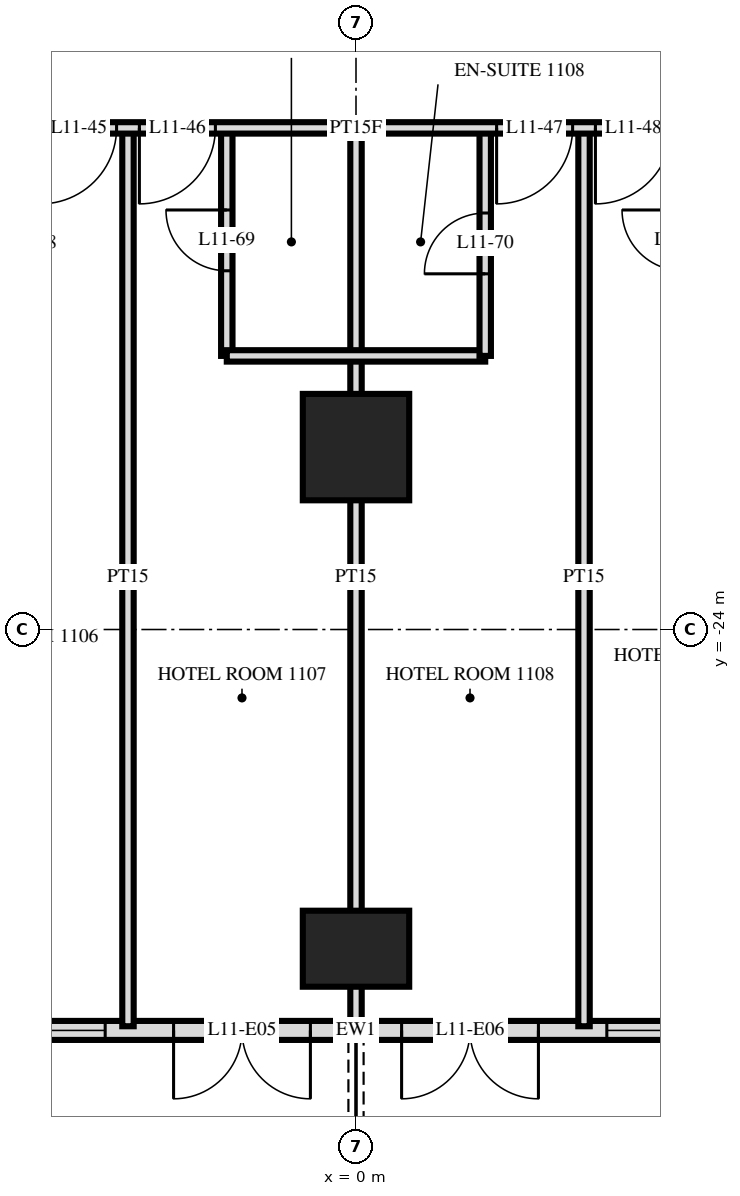
"""IFC4 building model, lengths in metres.
Left out: names, types, materials, properties, quantities, classifications, styles, units other than length and angle.
Written with IfcOpenShell. Run it as: python <this file> out.ifc"""

import sys

from ifc_helpers import new_model, si_unit, direction, frame, frame_2d, origin, origin_2d, place, context, subcontext, project, spatial, rectangle, extrude, element, fill, save


model = new_model("IFC4")
c1 = context("Model", 3, precision=1e-05, world=origin(), true_north=direction((0.0, 1.0)))
c2 = subcontext(c1, "Body", "Model", "MODEL_VIEW")
j1 = project(units=[si_unit("LENGTHUNIT", "METRE"), si_unit("PLANEANGLEUNIT", "RADIAN")], contexts=[c1])
p1 = place(None, origin())
s1 = spatial("IfcSite", under=j1, at=p1, CompositionType="ELEMENT")
p2 = place(p1, origin())
s2 = spatial("IfcBuilding", under=s1, at=p2, CompositionType="ELEMENT")
p3 = place(p2, frame((0.0, 0.0, 49.2)))
s3 = spatial("IfcBuildingStorey", under=s2, at=p3, CompositionType="ELEMENT", Elevation=49.2)
p4 = place(p3, frame((0.0, -28.2, 0.0), z_axis=(0.0, 0.0, 1.0), x_axis=(1.0, 0.0, 0.0)))
e1 = element("IfcColumn", 1, at=p4, inside=s3, PredefinedType="COLUMN", context=c2, shape_type="SweptSolid", body=[
    extrude(rectangle(XDim=1.4, YDim=1.0, at=origin_2d()), origin(), (0.0, 0.0, 1.0), 3.6),
])
p5 = place(p3, frame((0.0, -21.6, 0.0), z_axis=(0.0, 0.0, 1.0), x_axis=(1.0, 0.0, 0.0)))
e2 = element("IfcColumn", 2, at=p5, inside=s3, PredefinedType="COLUMN", context=c2, shape_type="SweptSolid", body=[
    extrude(rectangle(XDim=1.4, YDim=1.4, at=origin_2d()), origin(), (0.0, 0.0, 1.0), 3.6),
])
p6 = place(p3, frame((-28.775, -29.275, 0.0), z_axis=(0.0, 0.0, 1.0), x_axis=(1.0, 0.0, 0.0)))
e3 = element("IfcWall", 3, at=p6, inside=s3, PredefinedType="SOLIDWALL", context=c2, shape_type="SweptSolid", body=[
    extrude(rectangle(XDim=57.551, YDim=0.25, at=frame_2d((28.775, 0.0))), origin(), (0.0, 0.0, 1.0), 3.32),
])
p7 = place(p6, frame((0.575, 0.0, 0.0)))
e4 = element("IfcOpeningElement", 4, at=p7, cuts=e3, PredefinedType="OPENING", context=c2, shape_type="SweptSolid", body=[
    extrude(rectangle(XDim=1.8, YDim=2.4, at=frame_2d((0.9, 1.2))), frame((0.0, 0.135, 0.0), z_axis=(0.0, -1.0, 0.0), x_axis=(1.0, 0.0, 0.0)), (0.0, 0.0, 1.0), 0.27),
])
p8 = place(p6, frame((5.375, 0.0, 0.0)))
e5 = element("IfcOpeningElement", 5, at=p8, cuts=e3, PredefinedType="OPENING", context=c2, shape_type="SweptSolid", body=[
    extrude(rectangle(XDim=1.8, YDim=2.4, at=frame_2d((0.9, 1.2))), frame((0.0, 0.135, 0.0), z_axis=(0.0, -1.0, 0.0), x_axis=(1.0, 0.0, 0.0)), (0.0, 0.0, 1.0), 0.27),
])
p9 = place(p6, frame((8.075, 0.0, 0.3)))
e6 = element("IfcOpeningElement", 6, at=p9, cuts=e3, PredefinedType="OPENING", context=c2, shape_type="SweptSolid", body=[
    extrude(rectangle(XDim=2.4, YDim=2.1, at=frame_2d((1.2, 1.05))), frame((0.0, 0.135, 0.0), z_axis=(0.0, -1.0, 0.0), x_axis=(1.0, 0.0, 0.0)), (0.0, 0.0, 1.0), 0.27),
])
p10 = place(p6, frame((11.375, 0.0, 0.0)))
e7 = element("IfcOpeningElement", 7, at=p10, cuts=e3, PredefinedType="OPENING", context=c2, shape_type="SweptSolid", body=[
    extrude(rectangle(XDim=1.8, YDim=2.4, at=frame_2d((0.9, 1.2))), frame((0.0, 0.135, 0.0), z_axis=(0.0, -1.0, 0.0), x_axis=(1.0, 0.0, 0.0)), (0.0, 0.0, 1.0), 0.27),
])
p11 = place(p6, frame((14.075, 0.0, 0.3)))
e8 = element("IfcOpeningElement", 8, at=p11, cuts=e3, PredefinedType="OPENING", context=c2, shape_type="SweptSolid", body=[
    extrude(rectangle(XDim=2.4, YDim=2.1, at=frame_2d((1.2, 1.05))), frame((0.0, 0.135, 0.0), z_axis=(0.0, -1.0, 0.0), x_axis=(1.0, 0.0, 0.0)), (0.0, 0.0, 1.0), 0.27),
])
p12 = place(p6, frame((17.375, 0.0, 0.0)))
e9 = element("IfcOpeningElement", 9, at=p12, cuts=e3, PredefinedType="OPENING", context=c2, shape_type="SweptSolid", body=[
    extrude(rectangle(XDim=1.8, YDim=2.4, at=frame_2d((0.9, 1.2))), frame((0.0, 0.135, 0.0), z_axis=(0.0, -1.0, 0.0), x_axis=(1.0, 0.0, 0.0)), (0.0, 0.0, 1.0), 0.27),
])
p13 = place(p6, frame((20.075, 0.0, 0.3)))
e10 = element("IfcOpeningElement", 10, at=p13, cuts=e3, PredefinedType="OPENING", context=c2, shape_type="SweptSolid", body=[
    extrude(rectangle(XDim=2.4, YDim=2.1, at=frame_2d((1.2, 1.05))), frame((0.0, 0.135, 0.0), z_axis=(0.0, -1.0, 0.0), x_axis=(1.0, 0.0, 0.0)), (0.0, 0.0, 1.0), 0.27),
])
p14 = place(p6, frame((23.075, 0.0, 0.3)))
e11 = element("IfcOpeningElement", 11, at=p14, cuts=e3, PredefinedType="OPENING", context=c2, shape_type="SweptSolid", body=[
    extrude(rectangle(XDim=2.4, YDim=2.1, at=frame_2d((1.2, 1.05))), frame((0.0, 0.135, 0.0), z_axis=(0.0, -1.0, 0.0), x_axis=(1.0, 0.0, 0.0)), (0.0, 0.0, 1.0), 0.27),
])
p15 = place(p6, frame((26.375, 0.0, 0.0)))
e12 = element("IfcOpeningElement", 12, at=p15, cuts=e3, PredefinedType="OPENING", context=c2, shape_type="SweptSolid", body=[
    extrude(rectangle(XDim=1.8, YDim=2.4, at=frame_2d((0.9, 1.2))), frame((0.0, 0.135, 0.0), z_axis=(0.0, -1.0, 0.0), x_axis=(1.0, 0.0, 0.0)), (0.0, 0.0, 1.0), 0.27),
])
p16 = place(p6, frame((29.375, 0.0, 0.0)))
e13 = element("IfcOpeningElement", 13, at=p16, cuts=e3, PredefinedType="OPENING", context=c2, shape_type="SweptSolid", body=[
    extrude(rectangle(XDim=1.8, YDim=2.4, at=frame_2d((0.9, 1.2))), frame((0.0, 0.135, 0.0), z_axis=(0.0, -1.0, 0.0), x_axis=(1.0, 0.0, 0.0)), (0.0, 0.0, 1.0), 0.27),
])
p17 = place(p6, frame((32.075, 0.0, 0.3)))
e14 = element("IfcOpeningElement", 14, at=p17, cuts=e3, PredefinedType="OPENING", context=c2, shape_type="SweptSolid", body=[
    extrude(rectangle(XDim=2.4, YDim=2.1, at=frame_2d((1.2, 1.05))), frame((0.0, 0.135, 0.0), z_axis=(0.0, -1.0, 0.0), x_axis=(1.0, 0.0, 0.0)), (0.0, 0.0, 1.0), 0.27),
])
p18 = place(p6, frame((35.075, 0.0, 0.3)))
e15 = element("IfcOpeningElement", 15, at=p18, cuts=e3, PredefinedType="OPENING", context=c2, shape_type="SweptSolid", body=[
    extrude(rectangle(XDim=2.4, YDim=2.1, at=frame_2d((1.2, 1.05))), frame((0.0, 0.135, 0.0), z_axis=(0.0, -1.0, 0.0), x_axis=(1.0, 0.0, 0.0)), (0.0, 0.0, 1.0), 0.27),
])
p19 = place(p6, frame((38.375, 0.0, 0.0)))
e16 = element("IfcOpeningElement", 16, at=p19, cuts=e3, PredefinedType="OPENING", context=c2, shape_type="SweptSolid", body=[
    extrude(rectangle(XDim=1.8, YDim=2.4, at=frame_2d((0.9, 1.2))), frame((0.0, 0.135, 0.0), z_axis=(0.0, -1.0, 0.0), x_axis=(1.0, 0.0, 0.0)), (0.0, 0.0, 1.0), 0.27),
])
p20 = place(p6, frame((41.375, 0.0, 0.0)))
e17 = element("IfcOpeningElement", 17, at=p20, cuts=e3, PredefinedType="OPENING", context=c2, shape_type="SweptSolid", body=[
    extrude(rectangle(XDim=1.8, YDim=2.4, at=frame_2d((0.9, 1.2))), frame((0.0, 0.135, 0.0), z_axis=(0.0, -1.0, 0.0), x_axis=(1.0, 0.0, 0.0)), (0.0, 0.0, 1.0), 0.27),
])
p21 = place(p6, frame((44.075, 0.0, 0.3)))
e18 = element("IfcOpeningElement", 18, at=p21, cuts=e3, PredefinedType="OPENING", context=c2, shape_type="SweptSolid", body=[
    extrude(rectangle(XDim=2.4, YDim=2.1, at=frame_2d((1.2, 1.05))), frame((0.0, 0.135, 0.0), z_axis=(0.0, -1.0, 0.0), x_axis=(1.0, 0.0, 0.0)), (0.0, 0.0, 1.0), 0.27),
])
p22 = place(p6, frame((47.075, 0.0, 0.3)))
e19 = element("IfcOpeningElement", 19, at=p22, cuts=e3, PredefinedType="OPENING", context=c2, shape_type="SweptSolid", body=[
    extrude(rectangle(XDim=2.4, YDim=2.1, at=frame_2d((1.2, 1.05))), frame((0.0, 0.135, 0.0), z_axis=(0.0, -1.0, 0.0), x_axis=(1.0, 0.0, 0.0)), (0.0, 0.0, 1.0), 0.27),
])
p23 = place(p6, frame((50.375, 0.0, 0.0)))
e20 = element("IfcOpeningElement", 20, at=p23, cuts=e3, PredefinedType="OPENING", context=c2, shape_type="SweptSolid", body=[
    extrude(rectangle(XDim=1.8, YDim=2.4, at=frame_2d((0.9, 1.2))), frame((0.0, 0.135, 0.0), z_axis=(0.0, -1.0, 0.0), x_axis=(1.0, 0.0, 0.0)), (0.0, 0.0, 1.0), 0.27),
])
p24 = place(p6, frame((53.375, 0.0, 0.0)))
e21 = element("IfcOpeningElement", 21, at=p24, cuts=e3, PredefinedType="OPENING", context=c2, shape_type="SweptSolid", body=[
    extrude(rectangle(XDim=1.8, YDim=2.4, at=frame_2d((0.9, 1.2))), frame((0.0, 0.135, 0.0), z_axis=(0.0, -1.0, 0.0), x_axis=(1.0, 0.0, 0.0)), (0.0, 0.0, 1.0), 0.27),
])
p25 = place(p3, frame((3.0, -29.22, 0.0), z_axis=(0.0, 0.0, 1.0), x_axis=(0.0, 1.0, 0.0)))
e22 = element("IfcWall", 22, at=p25, inside=s3, PredefinedType="PARTITIONING", context=c2, shape_type="SweptSolid", body=[
    extrude(rectangle(XDim=11.82, YDim=0.15, at=frame_2d((5.91, 0.0))), origin(), (0.0, 0.0, 1.0), 3.32),
])
p26 = place(p3, frame((1.7, -20.4, 0.0), z_axis=(0.0, 0.0, 1.0), x_axis=(0.0, 1.0, 0.0)))
e23 = element("IfcWall", 23, at=p26, inside=s3, PredefinedType="PARTITIONING", context=c2, shape_type="SweptSolid", body=[
    extrude(rectangle(XDim=3.0, YDim=0.15, at=frame_2d((1.5, 0.0))), origin(), (0.0, 0.0, 1.0), 3.32),
])
p27 = place(p26, frame((1.08, 0.0, 0.0)))
e24 = element("IfcOpeningElement", 24, at=p27, cuts=e23, PredefinedType="OPENING", context=c2, shape_type="SweptSolid", body=[
    extrude(rectangle(XDim=0.8, YDim=2.1, at=frame_2d((0.4, 1.05))), frame((0.0, 0.085, 0.0), z_axis=(0.0, -1.0, 0.0), x_axis=(1.0, 0.0, 0.0)), (0.0, 0.0, 1.0), 0.17),
])
p28 = place(p3, frame((0.0, -29.22, 0.0), z_axis=(0.0, 0.0, 1.0), x_axis=(0.0, 1.0, 0.0)))
e25 = element("IfcWall", 25, at=p28, inside=s3, PredefinedType="PARTITIONING", context=c2, shape_type="SweptSolid", body=[
    extrude(rectangle(XDim=11.82, YDim=0.15, at=frame_2d((5.91, 0.0))), origin(), (0.0, 0.0, 1.0), 3.32),
])
p29 = place(p3, frame((-1.7, -20.4, 0.0), z_axis=(0.0, 0.0, 1.0), x_axis=(0.0, 1.0, 0.0)))
e26 = element("IfcWall", 26, at=p29, inside=s3, PredefinedType="PARTITIONING", context=c2, shape_type="SweptSolid", body=[
    extrude(rectangle(XDim=3.0, YDim=0.15, at=frame_2d((1.5, 0.0))), origin(), (0.0, 0.0, 1.0), 3.32),
])
p30 = place(p29, frame((1.12, 0.0, 0.0)))
e27 = element("IfcOpeningElement", 27, at=p30, cuts=e26, PredefinedType="OPENING", context=c2, shape_type="SweptSolid", body=[
    extrude(rectangle(XDim=0.8, YDim=2.1, at=frame_2d((0.4, 1.05))), frame((0.0, 0.085, 0.0), z_axis=(0.0, -1.0, 0.0), x_axis=(1.0, 0.0, 0.0)), (0.0, 0.0, 1.0), 0.17),
])
p31 = place(p3, frame((-3.0, -29.22, 0.0), z_axis=(0.0, 0.0, 1.0), x_axis=(0.0, 1.0, 0.0)))
e28 = element("IfcWall", 28, at=p31, inside=s3, PredefinedType="PARTITIONING", context=c2, shape_type="SweptSolid", body=[
    extrude(rectangle(XDim=11.82, YDim=0.15, at=frame_2d((5.91, 0.0))), origin(), (0.0, 0.0, 1.0), 3.32),
])
p32 = place(p3, frame((-1.7, -20.4, 0.0), z_axis=(0.0, 0.0, 1.0), x_axis=(1.0, 0.0, 0.0)))
e29 = element("IfcWall", 29, at=p32, inside=s3, PredefinedType="PARTITIONING", context=c2, shape_type="SweptSolid", body=[
    extrude(rectangle(XDim=3.4, YDim=0.15, at=frame_2d((1.7, 0.0))), origin(), (0.0, 0.0, 1.0), 3.32),
])
p33 = place(p3, frame((-33.12, -17.4, 0.0), z_axis=(0.0, 0.0, 1.0), x_axis=(1.0, 0.0, 0.0)))
e30 = element("IfcWall", 30, at=p33, inside=s3, PredefinedType="PARTITIONING", context=c2, shape_type="SweptSolid", body=[
    extrude(rectangle(XDim=66.24, YDim=0.15, at=frame_2d((33.12, 0.0))), origin(), (0.0, 0.0, 1.0), 3.32),
])
p34 = place(p33, frame((9.27, 0.0, 0.0)))
e31 = element("IfcOpeningElement", 31, at=p34, cuts=e30, PredefinedType="OPENING", context=c2, shape_type="SweptSolid", body=[
    extrude(rectangle(XDim=1.0, YDim=2.1, at=frame_2d((0.5, 1.05))), frame((0.0, 0.085, 0.0), z_axis=(0.0, -1.0, 0.0), x_axis=(1.0, 0.0, 0.0)), (0.0, 0.0, 1.0), 0.17),
])
p35 = place(p33, frame((13.97, 0.0, 0.0)))
e32 = element("IfcOpeningElement", 32, at=p35, cuts=e30, PredefinedType="OPENING", context=c2, shape_type="SweptSolid", body=[
    extrude(rectangle(XDim=1.0, YDim=2.1, at=frame_2d((0.5, 1.05))), frame((0.0, 0.085, 0.0), z_axis=(0.0, -1.0, 0.0), x_axis=(1.0, 0.0, 0.0)), (0.0, 0.0, 1.0), 0.17),
])
p36 = place(p33, frame((15.27, 0.0, 0.0)))
e33 = element("IfcOpeningElement", 33, at=p36, cuts=e30, PredefinedType="OPENING", context=c2, shape_type="SweptSolid", body=[
    extrude(rectangle(XDim=1.0, YDim=2.1, at=frame_2d((0.5, 1.05))), frame((0.0, 0.085, 0.0), z_axis=(0.0, -1.0, 0.0), x_axis=(1.0, 0.0, 0.0)), (0.0, 0.0, 1.0), 0.17),
])
p37 = place(p33, frame((19.97, 0.0, 0.0)))
e34 = element("IfcOpeningElement", 34, at=p37, cuts=e30, PredefinedType="OPENING", context=c2, shape_type="SweptSolid", body=[
    extrude(rectangle(XDim=1.0, YDim=2.1, at=frame_2d((0.5, 1.05))), frame((0.0, 0.085, 0.0), z_axis=(0.0, -1.0, 0.0), x_axis=(1.0, 0.0, 0.0)), (0.0, 0.0, 1.0), 0.17),
])
p38 = place(p33, frame((22.27, 0.0, 0.0)))
e35 = element("IfcOpeningElement", 35, at=p38, cuts=e30, PredefinedType="OPENING", context=c2, shape_type="SweptSolid", body=[
    extrude(rectangle(XDim=1.0, YDim=2.1, at=frame_2d((0.5, 1.05))), frame((0.0, 0.085, 0.0), z_axis=(0.0, -1.0, 0.0), x_axis=(1.0, 0.0, 0.0)), (0.0, 0.0, 1.0), 0.17),
])
p39 = place(p33, frame((28.97, 0.0, 0.0)))
e36 = element("IfcOpeningElement", 36, at=p39, cuts=e30, PredefinedType="OPENING", context=c2, shape_type="SweptSolid", body=[
    extrude(rectangle(XDim=1.0, YDim=2.1, at=frame_2d((0.5, 1.05))), frame((0.0, 0.085, 0.0), z_axis=(0.0, -1.0, 0.0), x_axis=(1.0, 0.0, 0.0)), (0.0, 0.0, 1.0), 0.17),
])
p40 = place(p33, frame((30.27, 0.0, 0.0)))
e37 = element("IfcOpeningElement", 37, at=p40, cuts=e30, PredefinedType="OPENING", context=c2, shape_type="SweptSolid", body=[
    extrude(rectangle(XDim=1.0, YDim=2.1, at=frame_2d((0.5, 1.05))), frame((0.0, 0.085, 0.0), z_axis=(0.0, -1.0, 0.0), x_axis=(1.0, 0.0, 0.0)), (0.0, 0.0, 1.0), 0.17),
])
p41 = place(p33, frame((34.97, 0.0, 0.0)))
e38 = element("IfcOpeningElement", 38, at=p41, cuts=e30, PredefinedType="OPENING", context=c2, shape_type="SweptSolid", body=[
    extrude(rectangle(XDim=1.0, YDim=2.1, at=frame_2d((0.5, 1.05))), frame((0.0, 0.085, 0.0), z_axis=(0.0, -1.0, 0.0), x_axis=(1.0, 0.0, 0.0)), (0.0, 0.0, 1.0), 0.17),
])
p42 = place(p33, frame((36.27, 0.0, 0.0)))
e39 = element("IfcOpeningElement", 39, at=p42, cuts=e30, PredefinedType="OPENING", context=c2, shape_type="SweptSolid", body=[
    extrude(rectangle(XDim=1.0, YDim=2.1, at=frame_2d((0.5, 1.05))), frame((0.0, 0.085, 0.0), z_axis=(0.0, -1.0, 0.0), x_axis=(1.0, 0.0, 0.0)), (0.0, 0.0, 1.0), 0.17),
])
p43 = place(p33, frame((39.82, 0.0, 0.0)))
e40 = element("IfcOpeningElement", 40, at=p43, cuts=e30, PredefinedType="OPENING", context=c2, shape_type="SweptSolid", body=[
    extrude(rectangle(XDim=1.0, YDim=2.1, at=frame_2d((0.5, 1.05))), frame((0.0, 0.085, 0.0), z_axis=(0.0, -1.0, 0.0), x_axis=(1.0, 0.0, 0.0)), (0.0, 0.0, 1.0), 0.17),
])
p44 = place(p33, frame((51.27, 0.0, 0.0)))
e41 = element("IfcOpeningElement", 41, at=p44, cuts=e30, PredefinedType="OPENING", context=c2, shape_type="SweptSolid", body=[
    extrude(rectangle(XDim=1.0, YDim=2.1, at=frame_2d((0.5, 1.05))), frame((0.0, 0.085, 0.0), z_axis=(0.0, -1.0, 0.0), x_axis=(1.0, 0.0, 0.0)), (0.0, 0.0, 1.0), 0.17),
])
p45 = place(p33, frame((4.42, 0.0, 0.0)))
e42 = element("IfcOpeningElement", 42, at=p45, cuts=e30, PredefinedType="OPENING", context=c2, shape_type="SweptSolid", body=[
    extrude(rectangle(XDim=1.0, YDim=2.1, at=frame_2d((0.5, 1.05))), frame((0.0, 0.085, 0.0), z_axis=(0.0, -1.0, 0.0), x_axis=(1.0, 0.0, 0.0)), (0.0, 0.0, 1.0), 0.17),
])
p46 = place(p33, frame((54.82, 0.0, 0.0)))
e43 = element("IfcOpeningElement", 43, at=p46, cuts=e30, PredefinedType="OPENING", context=c2, shape_type="SweptSolid", body=[
    extrude(rectangle(XDim=1.0, YDim=2.1, at=frame_2d((0.5, 1.05))), frame((0.0, 0.085, 0.0), z_axis=(0.0, -1.0, 0.0), x_axis=(1.0, 0.0, 0.0)), (0.0, 0.0, 1.0), 0.17),
])
p47 = place(p14, origin())
e44 = element("IfcWindow", 44, at=p47, inside=s3, PartitioningType="SINGLE_PANEL", PredefinedType="WINDOW", context=c2, shape_type="SweptSolid", body=[
    extrude(rectangle(XDim=2.4, YDim=2.1, at=frame_2d((1.2, 1.05))), frame((0.0, 0.03, 0.0), z_axis=(0.0, -1.0, 0.0), x_axis=(1.0, 0.0, 0.0)), (0.0, 0.0, 1.0), 0.06),
])
fill(e11, e44)
p48 = place(p15, frame((0.9, 0.0, 0.0), z_axis=(0.0, 0.0, 1.0), x_axis=(-1.0, 0.0, 0.0)))
e45 = element("IfcDoor", 45, at=p48, inside=s3, OperationType="DOUBLE_DOOR_SINGLE_SWING", PredefinedType="DOOR", context=c2, shape_type="SweptSolid", body=[
    extrude(rectangle(XDim=1.8, YDim=2.4, at=frame_2d((0.0, 1.2))), frame((0.0, -0.025, 0.0), z_axis=(0.0, 1.0, 0.0), x_axis=(-1.0, 0.0, 0.0)), (0.0, 0.0, 1.0), 0.05),
])
fill(e12, e45)
p49 = place(p16, frame((0.9, 0.0, 0.0), z_axis=(0.0, 0.0, 1.0), x_axis=(-1.0, 0.0, 0.0)))
e46 = element("IfcDoor", 46, at=p49, inside=s3, OperationType="DOUBLE_DOOR_SINGLE_SWING", PredefinedType="DOOR", context=c2, shape_type="SweptSolid", body=[
    extrude(rectangle(XDim=1.8, YDim=2.4, at=frame_2d((0.0, 1.2))), frame((0.0, -0.025, 0.0), z_axis=(0.0, 1.0, 0.0), x_axis=(-1.0, 0.0, 0.0)), (0.0, 0.0, 1.0), 0.05),
])
fill(e13, e46)
p50 = place(p17, origin())
e47 = element("IfcWindow", 47, at=p50, inside=s3, PartitioningType="SINGLE_PANEL", PredefinedType="WINDOW", context=c2, shape_type="SweptSolid", body=[
    extrude(rectangle(XDim=2.4, YDim=2.1, at=frame_2d((1.2, 1.05))), frame((0.0, 0.03, 0.0), z_axis=(0.0, -1.0, 0.0), x_axis=(1.0, 0.0, 0.0)), (0.0, 0.0, 1.0), 0.06),
])
fill(e14, e47)
p51 = place(p39, frame((0.5, 0.0, 0.0), z_axis=(0.0, 0.0, 1.0), x_axis=(-1.0, 0.0, 0.0)))
e48 = element("IfcDoor", 48, at=p51, inside=s3, OperationType="SINGLE_SWING_LEFT", PredefinedType="DOOR", context=c2, shape_type="SweptSolid", body=[
    extrude(rectangle(XDim=1.0, YDim=2.1, at=frame_2d((0.0, 1.05))), frame((0.0, -0.025, 0.0), z_axis=(0.0, 1.0, 0.0), x_axis=(-1.0, 0.0, 0.0)), (0.0, 0.0, 1.0), 0.05),
])
fill(e36, e48)
p52 = place(p40, frame((0.5, 0.0, 0.0), z_axis=(0.0, 0.0, 1.0), x_axis=(-1.0, 0.0, 0.0)))
e49 = element("IfcDoor", 49, at=p52, inside=s3, OperationType="SINGLE_SWING_LEFT", PredefinedType="DOOR", context=c2, shape_type="SweptSolid", body=[
    extrude(rectangle(XDim=1.0, YDim=2.1, at=frame_2d((0.0, 1.05))), frame((0.0, -0.025, 0.0), z_axis=(0.0, 1.0, 0.0), x_axis=(-1.0, 0.0, 0.0)), (0.0, 0.0, 1.0), 0.05),
])
fill(e37, e49)
p53 = place(p41, frame((0.5, 0.0, 0.0), z_axis=(0.0, 0.0, 1.0), x_axis=(-1.0, 0.0, 0.0)))
e50 = element("IfcDoor", 50, at=p53, inside=s3, OperationType="SINGLE_SWING_LEFT", PredefinedType="DOOR", context=c2, shape_type="SweptSolid", body=[
    extrude(rectangle(XDim=1.0, YDim=2.1, at=frame_2d((0.0, 1.05))), frame((0.0, -0.025, 0.0), z_axis=(0.0, 1.0, 0.0), x_axis=(-1.0, 0.0, 0.0)), (0.0, 0.0, 1.0), 0.05),
])
fill(e38, e50)
p54 = place(p42, frame((0.5, 0.0, 0.0), z_axis=(0.0, 0.0, 1.0), x_axis=(-1.0, 0.0, 0.0)))
e51 = element("IfcDoor", 51, at=p54, inside=s3, OperationType="SINGLE_SWING_LEFT", PredefinedType="DOOR", context=c2, shape_type="SweptSolid", body=[
    extrude(rectangle(XDim=1.0, YDim=2.1, at=frame_2d((0.0, 1.05))), frame((0.0, -0.025, 0.0), z_axis=(0.0, 1.0, 0.0), x_axis=(-1.0, 0.0, 0.0)), (0.0, 0.0, 1.0), 0.05),
])
fill(e39, e51)
p55 = place(p30, origin())
e52 = element("IfcDoor", 52, at=p55, inside=s3, OperationType="SINGLE_SWING_LEFT", PredefinedType="DOOR", context=c2, shape_type="SweptSolid", body=[
    extrude(rectangle(XDim=0.8, YDim=2.1, at=frame_2d((0.4, 1.05))), frame((0.0, 0.025, 0.0), z_axis=(0.0, -1.0, 0.0), x_axis=(1.0, 0.0, 0.0)), (0.0, 0.0, 1.0), 0.05),
])
fill(e27, e52)
p56 = place(p27, origin())
e53 = element("IfcDoor", 53, at=p56, inside=s3, OperationType="SINGLE_SWING_RIGHT", PredefinedType="DOOR", context=c2, shape_type="SweptSolid", body=[
    extrude(rectangle(XDim=0.8, YDim=2.1, at=frame_2d((0.4, 1.05))), frame((0.0, 0.025, 0.0), z_axis=(0.0, -1.0, 0.0), x_axis=(1.0, 0.0, 0.0)), (0.0, 0.0, 1.0), 0.05),
])
fill(e24, e53)
save(model, sys.argv[1])
